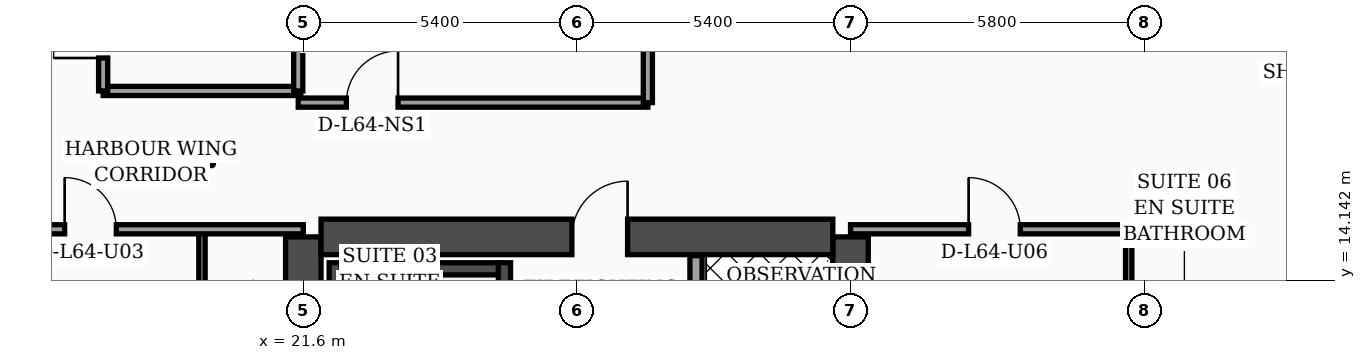
"""IFC4 building model, lengths in metres.
Left out: names, types, materials, properties, quantities, classifications, styles, units other than length and angle.
Written with IfcOpenShell. Run it as: python <this file> out.ifc"""

import sys

from ifc_helpers import new_model, si_unit, direction, frame, frame_2d, origin, place, context, subcontext, project, spatial, rectangle, extrude, element, fill, save


model = new_model("IFC4")
c1 = context("Model", 3, precision=1e-05, world=origin(), true_north=direction((0.0, 1.0)))
c2 = subcontext(c1, "Body", "Model", "MODEL_VIEW")
j1 = project(units=[si_unit("LENGTHUNIT", "METRE"), si_unit("PLANEANGLEUNIT", "RADIAN")], contexts=[c1])
p1 = place(None, origin())
s1 = spatial("IfcSite", under=j1, at=p1, CompositionType="ELEMENT")
p2 = place(p1, origin())
s2 = spatial("IfcBuilding", under=s1, at=p2, CompositionType="ELEMENT")
p3 = place(p2, frame((0.0, 0.0, 259.0)))
s3 = spatial("IfcBuildingStorey", under=s2, at=p3, CompositionType="ELEMENT", Elevation=259.0)
for number, where, z_axis, x_axis in (
    (1, (21.6, 4.6, 0.0), (0.0, 0.0, 1.0), (0.0, 1.0, 0.0)),
    (2, (32.4, 4.6, 0.0), (0.0, 0.0, 1.0), (0.0, 1.0, 0.0)),
):
    element("IfcWall", number, at=place(p3, frame(where, z_axis=z_axis, x_axis=x_axis)), inside=s3, PredefinedType="SHEAR", context=c2, shape_type="SweptSolid", body=[
        extrude(rectangle(XDim=10.4, YDim=0.7, at=frame_2d((5.2, 0.0))), origin(), (0.0, 0.0, 1.0), 4.05),
    ])
p4 = place(p3, frame((21.95, 15.0, 0.0), z_axis=(0.0, 0.0, 1.0), x_axis=(1.0, 0.0, 0.0)))
e3 = element("IfcWall", 3, at=p4, inside=s3, PredefinedType="SHEAR", context=c2, shape_type="SweptSolid", body=[
    extrude(rectangle(XDim=10.1, YDim=0.7, at=frame_2d((5.05, 0.0))), origin(), (0.0, 0.0, 1.0), 4.05),
])
p5 = place(p4, frame((4.95, 0.0, 0.0)))
e4 = element("IfcOpeningElement", 4, at=p5, cuts=e3, PredefinedType="OPENING", context=c2, shape_type="SweptSolid", body=[
    extrude(rectangle(XDim=1.1, YDim=2.2, at=frame_2d((0.55, 1.1))), frame((0.0, 0.36, 0.0), z_axis=(0.0, -1.0, 0.0), x_axis=(1.0, 0.0, 0.0)), (0.0, 0.0, 1.0), 0.72),
])
p6 = place(p3, frame((22.23, 4.95, 0.0), z_axis=(0.0, 0.0, 1.0), x_axis=(0.0, 1.0, 0.0)))
e5 = element("IfcWall", 5, at=p6, inside=s3, PredefinedType="SOLIDWALL", context=c2, shape_type="SweptSolid", body=[
    extrude(rectangle(XDim=9.54, YDim=0.24, at=frame_2d((4.77, 0.0))), origin(), (0.0, 0.0, 1.0), 4.05),
])
p7 = place(p3, frame((25.57, 4.95, 0.0), z_axis=(0.0, 0.0, 1.0), x_axis=(0.0, 1.0, 0.0)))
e6 = element("IfcWall", 6, at=p7, inside=s3, PredefinedType="SOLIDWALL", context=c2, shape_type="SweptSolid", body=[
    extrude(rectangle(XDim=9.54, YDim=0.24, at=frame_2d((4.77, 0.0))), origin(), (0.0, 0.0, 1.0), 4.05),
])
p8 = place(p7, frame((0.35, 0.0, 0.0)))
e7 = element("IfcOpeningElement", 7, at=p8, cuts=e6, PredefinedType="OPENING", context=c2, shape_type="SweptSolid", body=[
    extrude(rectangle(XDim=1.15, YDim=2.2, at=frame_2d((0.575, 1.1))), frame((0.0, 0.13, 0.0), z_axis=(0.0, -1.0, 0.0), x_axis=(1.0, 0.0, 0.0)), (0.0, 0.0, 1.0), 0.26),
])
p9 = place(p3, frame((22.35, 14.37, 0.0), z_axis=(0.0, 0.0, 1.0), x_axis=(1.0, 0.0, 0.0)))
e8 = element("IfcWall", 8, at=p9, inside=s3, PredefinedType="SOLIDWALL", context=c2, shape_type="SweptSolid", body=[
    extrude(rectangle(XDim=3.1, YDim=0.24, at=frame_2d((1.55, 0.0))), origin(), (0.0, 0.0, 1.0), 4.05),
])
p10 = place(p3, frame((46.63, 5.505, 0.0), z_axis=(0.0, 0.0, 1.0), x_axis=(-0.300501856448, 0.953781229775, 0.0)))
e9 = element("IfcWall", 9, at=p10, inside=s3, PredefinedType="SOLIDWALL", context=c2, shape_type="SweptSolid", body=[
    extrude(rectangle(XDim=30.814, YDim=0.32, at=frame_2d((15.407, 0.0))), origin(), (0.0, 0.0, 1.0), 4.05),
])
p11 = place(p10, frame((18.796, 0.0, 0.0)))
e10 = element("IfcOpeningElement", 10, at=p11, cuts=e9, PredefinedType="OPENING", context=c2, shape_type="SweptSolid", body=[
    extrude(rectangle(XDim=1.4, YDim=2.25, at=frame_2d((0.7, 1.125))), frame((0.0, 0.17, 0.0), z_axis=(0.0, -1.0, 0.0), x_axis=(1.0, 0.0, 0.0)), (0.0, 0.0, 1.0), 0.34),
])
p12 = place(p10, frame((4.437, 0.0, 0.7)))
e11 = element("IfcOpeningElement", 11, at=p12, cuts=e9, PredefinedType="OPENING", context=c2, shape_type="SweptSolid", body=[
    extrude(rectangle(XDim=1.6, YDim=1.65, at=frame_2d((0.8, 0.825))), frame((0.0, 0.17, 0.0), z_axis=(0.0, -1.0, 0.0), x_axis=(1.0, 0.0, 0.0)), (0.0, 0.0, 1.0), 0.34),
])
p13 = place(p10, frame((9.889, 0.0, 0.7)))
e12 = element("IfcOpeningElement", 12, at=p13, cuts=e9, PredefinedType="OPENING", context=c2, shape_type="SweptSolid", body=[
    extrude(rectangle(XDim=1.6, YDim=1.65, at=frame_2d((0.8, 0.825))), frame((0.0, 0.17, 0.0), z_axis=(0.0, -1.0, 0.0), x_axis=(1.0, 0.0, 0.0)), (0.0, 0.0, 1.0), 0.34),
])
p14 = place(p10, frame((1.6, 0.0, 0.75)))
e13 = element("IfcOpeningElement", 13, at=p14, cuts=e9, PredefinedType="OPENING", context=c2, shape_type="SweptSolid", body=[
    extrude(rectangle(XDim=1.5, YDim=1.6, at=frame_2d((0.75, 0.8))), frame((0.0, 0.17, 0.0), z_axis=(0.0, -1.0, 0.0), x_axis=(1.0, 0.0, 0.0)), (0.0, 0.0, 1.0), 0.34),
])
p15 = place(p10, frame((7.8, 0.0, 0.75)))
e14 = element("IfcOpeningElement", 14, at=p15, cuts=e9, PredefinedType="OPENING", context=c2, shape_type="SweptSolid", body=[
    extrude(rectangle(XDim=1.5, YDim=1.6, at=frame_2d((0.75, 0.8))), frame((0.0, 0.17, 0.0), z_axis=(0.0, -1.0, 0.0), x_axis=(1.0, 0.0, 0.0)), (0.0, 0.0, 1.0), 0.34),
])
p16 = place(p10, frame((11.95, 0.0, 0.75)))
e15 = element("IfcOpeningElement", 15, at=p16, cuts=e9, PredefinedType="OPENING", context=c2, shape_type="SweptSolid", body=[
    extrude(rectangle(XDim=1.5, YDim=1.6, at=frame_2d((0.75, 0.8))), frame((0.0, 0.17, 0.0), z_axis=(0.0, -1.0, 0.0), x_axis=(1.0, 0.0, 0.0)), (0.0, 0.0, 1.0), 0.34),
])
p17 = place(p10, frame((14.0, 0.0, 0.75)))
e16 = element("IfcOpeningElement", 16, at=p17, cuts=e9, PredefinedType="OPENING", context=c2, shape_type="SweptSolid", body=[
    extrude(rectangle(XDim=1.5, YDim=1.6, at=frame_2d((0.75, 0.8))), frame((0.0, 0.17, 0.0), z_axis=(0.0, -1.0, 0.0), x_axis=(1.0, 0.0, 0.0)), (0.0, 0.0, 1.0), 0.34),
])
p18 = place(p10, frame((16.55, 0.0, 0.75)))
e17 = element("IfcOpeningElement", 17, at=p18, cuts=e9, PredefinedType="OPENING", context=c2, shape_type="SweptSolid", body=[
    extrude(rectangle(XDim=1.5, YDim=1.6, at=frame_2d((0.75, 0.8))), frame((0.0, 0.17, 0.0), z_axis=(0.0, -1.0, 0.0), x_axis=(1.0, 0.0, 0.0)), (0.0, 0.0, 1.0), 0.34),
])
p19 = place(p10, frame((20.75, 0.0, 0.75)))
e18 = element("IfcOpeningElement", 18, at=p19, cuts=e9, PredefinedType="OPENING", context=c2, shape_type="SweptSolid", body=[
    extrude(rectangle(XDim=1.5, YDim=1.6, at=frame_2d((0.75, 0.8))), frame((0.0, 0.17, 0.0), z_axis=(0.0, -1.0, 0.0), x_axis=(1.0, 0.0, 0.0)), (0.0, 0.0, 1.0), 0.34),
])
p20 = place(p10, frame((23.3, 0.0, 0.75)))
e19 = element("IfcOpeningElement", 19, at=p20, cuts=e9, PredefinedType="OPENING", context=c2, shape_type="SweptSolid", body=[
    extrude(rectangle(XDim=1.5, YDim=1.6, at=frame_2d((0.75, 0.8))), frame((0.0, 0.17, 0.0), z_axis=(0.0, -1.0, 0.0), x_axis=(1.0, 0.0, 0.0)), (0.0, 0.0, 1.0), 0.34),
])
p21 = place(p10, frame((26.4, 0.0, 0.75)))
e20 = element("IfcOpeningElement", 20, at=p21, cuts=e9, PredefinedType="OPENING", context=c2, shape_type="SweptSolid", body=[
    extrude(rectangle(XDim=1.5, YDim=1.6, at=frame_2d((0.75, 0.8))), frame((0.0, 0.17, 0.0), z_axis=(0.0, -1.0, 0.0), x_axis=(1.0, 0.0, 0.0)), (0.0, 0.0, 1.0), 0.34),
])
p22 = place(p3, frame((29.35, 4.97, 0.0), z_axis=(0.0, 0.0, 1.0), x_axis=(0.0, 1.0, 0.0)))
e21 = element("IfcWall", 21, at=p22, inside=s3, PredefinedType="SOLIDWALL", context=c2, shape_type="SweptSolid", body=[
    extrude(rectangle(XDim=9.66, YDim=0.24, at=frame_2d((4.83, 0.0))), origin(), (0.0, 0.0, 1.0), 4.05),
])
p23 = place(p22, frame((0.55, 0.0, 0.0)))
e22 = element("IfcOpeningElement", 22, at=p23, cuts=e21, PredefinedType="OPENING", context=c2, shape_type="SweptSolid", body=[
    extrude(rectangle(XDim=1.3, YDim=2.35, at=frame_2d((0.65, 1.175))), frame((0.0, 0.13, 0.0), z_axis=(0.0, -1.0, 0.0), x_axis=(1.0, 0.0, 0.0)), (0.0, 0.0, 1.0), 0.26),
])
p24 = place(p3, frame((19.6, 2.44, 0.0), z_axis=(0.0, 0.0, 1.0), x_axis=(0.0, 1.0, 0.0)))
e23 = element("IfcWall", 23, at=p24, inside=s3, PredefinedType="PARTITIONING", context=c2, shape_type="SweptSolid", body=[
    extrude(rectangle(XDim=12.71, YDim=0.125, at=frame_2d((6.355, 0.0))), origin(), (0.0, 0.0, 1.0), 2.35),
])
p25 = place(p24, frame((4.34, 0.0, 0.0)))
e24 = element("IfcOpeningElement", 24, at=p25, cuts=e23, PredefinedType="OPENING", context=c2, shape_type="SweptSolid", body=[
    extrude(rectangle(XDim=0.96, YDim=2.2, at=frame_2d((0.48, 1.1))), frame((0.0, 0.073, 0.0), z_axis=(0.0, -1.0, 0.0), x_axis=(1.0, 0.0, 0.0)), (0.0, 0.0, 1.0), 0.145),
])
p26 = place(p24, frame((10.18, 0.0, 0.0)))
e25 = element("IfcOpeningElement", 25, at=p26, cuts=e23, PredefinedType="OPENING", context=c2, shape_type="SweptSolid", body=[
    extrude(rectangle(XDim=0.9, YDim=2.15, at=frame_2d((0.45, 1.075))), frame((0.0, 0.073, 0.0), z_axis=(0.0, -1.0, 0.0), x_axis=(1.0, 0.0, 0.0)), (0.0, 0.0, 1.0), 0.145),
])
p27 = place(p3, frame((15.15, 15.15, 0.0), z_axis=(0.0, 0.0, 1.0), x_axis=(1.0, 0.0, 0.0)))
e26 = element("IfcWall", 26, at=p27, inside=s3, PredefinedType="PARTITIONING", context=c2, shape_type="SweptSolid", body=[
    extrude(rectangle(XDim=6.45, YDim=0.18, at=frame_2d((3.225, 0.0))), origin(), (0.0, 0.0, 1.0), 2.35),
])
p28 = place(p27, frame((1.74, 0.0, 0.0)))
e27 = element("IfcOpeningElement", 27, at=p28, cuts=e26, PredefinedType="OPENING", context=c2, shape_type="SweptSolid", body=[
    extrude(rectangle(XDim=1.02, YDim=2.2, at=frame_2d((0.51, 1.1))), frame((0.0, 0.1, 0.0), z_axis=(0.0, -1.0, 0.0), x_axis=(1.0, 0.0, 0.0)), (0.0, 0.0, 1.0), 0.2),
])
p29 = place(p3, frame((17.65, 17.88, 0.0), z_axis=(0.0, 0.0, 1.0), x_axis=(1.0, 0.0, 0.0)))
e28 = element("IfcWall", 28, at=p29, inside=s3, PredefinedType="PARTITIONING", context=c2, shape_type="SweptSolid", body=[
    extrude(rectangle(XDim=3.9, YDim=0.18, at=frame_2d((1.95, 0.0))), origin(), (0.0, 0.0, 1.0), 4.05),
])
p30 = place(p3, frame((21.5, 17.88, 0.0), z_axis=(0.0, 0.0, 1.0), x_axis=(0.0, 1.0, 0.0)))
e29 = element("IfcWall", 29, at=p30, inside=s3, PredefinedType="PARTITIONING", context=c2, shape_type="SweptSolid", body=[
    extrude(rectangle(XDim=6.44, YDim=0.18, at=frame_2d((3.22, 0.0))), origin(), (0.0, 0.0, 1.0), 4.05),
])
p31 = place(p3, frame((17.65, 17.88, 0.0), z_axis=(0.0, 0.0, 1.0), x_axis=(0.0, 1.0, 0.0)))
e30 = element("IfcWall", 30, at=p31, inside=s3, PredefinedType="PARTITIONING", context=c2, shape_type="SweptSolid", body=[
    extrude(rectangle(XDim=6.44, YDim=0.18, at=frame_2d((3.22, 0.0))), origin(), (0.0, 0.0, 1.0), 4.05),
])
p32 = place(p31, frame((0.65, 0.0, 0.0)))
e31 = element("IfcOpeningElement", 31, at=p32, cuts=e30, PredefinedType="OPENING", context=c2, shape_type="SweptSolid", body=[
    extrude(rectangle(XDim=0.98, YDim=2.15, at=frame_2d((0.49, 1.075))), frame((0.0, 0.1, 0.0), z_axis=(0.0, -1.0, 0.0), x_axis=(1.0, 0.0, 0.0)), (0.0, 0.0, 1.0), 0.2),
])
p33 = place(p31, frame((3.97, 0.0, 0.0)))
e32 = element("IfcOpeningElement", 32, at=p33, cuts=e30, PredefinedType="OPENING", context=c2, shape_type="SweptSolid", body=[
    extrude(rectangle(XDim=0.96, YDim=2.2, at=frame_2d((0.48, 1.1))), frame((0.0, 0.1, 0.0), z_axis=(0.0, -1.0, 0.0), x_axis=(1.0, 0.0, 0.0)), (0.0, 0.0, 1.0), 0.2),
])
p34 = place(p3, frame((37.89, 2.44, 0.0), z_axis=(0.0, 0.0, 1.0), x_axis=(0.0, 1.0, 0.0)))
e33 = element("IfcWall", 33, at=p34, inside=s3, PredefinedType="PARTITIONING", context=c2, shape_type="SweptSolid", body=[
    extrude(rectangle(XDim=12.71, YDim=0.125, at=frame_2d((6.355, 0.0))), origin(), (0.0, 0.0, 1.0), 2.35),
])
p35 = place(p34, frame((4.35, 0.0, 0.0)))
e34 = element("IfcOpeningElement", 34, at=p35, cuts=e33, PredefinedType="OPENING", context=c2, shape_type="SweptSolid", body=[
    extrude(rectangle(XDim=0.96, YDim=2.2, at=frame_2d((0.48, 1.1))), frame((0.0, 0.073, 0.0), z_axis=(0.0, -1.0, 0.0), x_axis=(1.0, 0.0, 0.0)), (0.0, 0.0, 1.0), 0.145),
])
p36 = place(p34, frame((10.21, 0.0, 0.0)))
e35 = element("IfcOpeningElement", 35, at=p36, cuts=e33, PredefinedType="OPENING", context=c2, shape_type="SweptSolid", body=[
    extrude(rectangle(XDim=0.9, YDim=2.15, at=frame_2d((0.45, 1.075))), frame((0.0, 0.073, 0.0), z_axis=(0.0, -1.0, 0.0), x_axis=(1.0, 0.0, 0.0)), (0.0, 0.0, 1.0), 0.145),
])
p37 = place(p3, frame((32.4, 15.15, 0.0), z_axis=(0.0, 0.0, 1.0), x_axis=(1.0, 0.0, 0.0)))
e36 = element("IfcWall", 36, at=p37, inside=s3, PredefinedType="PARTITIONING", context=c2, shape_type="SweptSolid", body=[
    extrude(rectangle(XDim=7.6, YDim=0.18, at=frame_2d((3.8, 0.0))), origin(), (0.0, 0.0, 1.0), 2.35),
])
p38 = place(p37, frame((2.33, 0.0, 0.0)))
e37 = element("IfcOpeningElement", 37, at=p38, cuts=e36, PredefinedType="OPENING", context=c2, shape_type="SweptSolid", body=[
    extrude(rectangle(XDim=1.02, YDim=2.2, at=frame_2d((0.51, 1.1))), frame((0.0, 0.1, 0.0), z_axis=(0.0, -1.0, 0.0), x_axis=(1.0, 0.0, 0.0)), (0.0, 0.0, 1.0), 0.2),
])
p39 = place(p3, frame((21.5, 17.65, 0.0), z_axis=(0.0, 0.0, 1.0), x_axis=(1.0, 0.0, 0.0)))
e38 = element("IfcWall", 38, at=p39, inside=s3, PredefinedType="PARTITIONING", context=c2, shape_type="SweptSolid", body=[
    extrude(rectangle(XDim=6.9, YDim=0.18, at=frame_2d((3.45, 0.0))), origin(), (0.0, 0.0, 1.0), 2.35),
])
p40 = place(p39, frame((0.95, 0.0, 0.0)))
e39 = element("IfcOpeningElement", 39, at=p40, cuts=e38, PredefinedType="OPENING", context=c2, shape_type="SweptSolid", body=[
    extrude(rectangle(XDim=1.02, YDim=2.2, at=frame_2d((0.51, 1.1))), frame((0.0, 0.1, 0.0), z_axis=(0.0, -1.0, 0.0), x_axis=(1.0, 0.0, 0.0)), (0.0, 0.0, 1.0), 0.2),
])
p41 = place(p3, frame((28.4, 17.65, 0.0), z_axis=(0.0, 0.0, 1.0), x_axis=(0.0, 1.0, 0.0)))
e40 = element("IfcWall", 40, at=p41, inside=s3, PredefinedType="PARTITIONING", context=c2, shape_type="SweptSolid", body=[
    extrude(rectangle(XDim=14.67, YDim=0.18, at=frame_2d((7.335, 0.0))), origin(), (0.0, 0.0, 1.0), 2.35),
])
p42 = place(p28, origin())
e41 = element("IfcDoor", 41, at=p42, inside=s3, OperationType="SINGLE_SWING_LEFT", PredefinedType="DOOR", context=c2, shape_type="SweptSolid", body=[
    extrude(rectangle(XDim=1.02, YDim=2.2, at=frame_2d((0.51, 1.1))), frame((0.0, 0.025, 0.0), z_axis=(0.0, -1.0, 0.0), x_axis=(1.0, 0.0, 0.0)), (0.0, 0.0, 1.0), 0.05),
])
fill(e27, e41)
p43 = place(p32, origin())
e42 = element("IfcDoor", 42, at=p43, inside=s3, OperationType="SINGLE_SWING_LEFT", PredefinedType="DOOR", context=c2, shape_type="SweptSolid", body=[
    extrude(rectangle(XDim=0.98, YDim=2.15, at=frame_2d((0.49, 1.075))), frame((0.0, 0.025, 0.0), z_axis=(0.0, -1.0, 0.0), x_axis=(1.0, 0.0, 0.0)), (0.0, 0.0, 1.0), 0.05),
])
fill(e31, e42)
p44 = place(p38, origin())
e43 = element("IfcDoor", 43, at=p44, inside=s3, OperationType="SINGLE_SWING_LEFT", PredefinedType="DOOR", context=c2, shape_type="SweptSolid", body=[
    extrude(rectangle(XDim=1.02, YDim=2.2, at=frame_2d((0.51, 1.1))), frame((0.0, 0.025, 0.0), z_axis=(0.0, -1.0, 0.0), x_axis=(1.0, 0.0, 0.0)), (0.0, 0.0, 1.0), 0.05),
])
fill(e37, e43)
p45 = place(p40, origin())
e44 = element("IfcDoor", 44, at=p45, inside=s3, OperationType="SINGLE_SWING_RIGHT", PredefinedType="DOOR", context=c2, shape_type="SweptSolid", body=[
    extrude(rectangle(XDim=1.02, YDim=2.2, at=frame_2d((0.51, 1.1))), frame((0.0, 0.025, 0.0), z_axis=(0.0, -1.0, 0.0), x_axis=(1.0, 0.0, 0.0)), (0.0, 0.0, 1.0), 0.05),
])
fill(e39, e44)
p46 = place(p5, origin())
e45 = element("IfcDoor", 45, at=p46, inside=s3, OperationType="SINGLE_SWING_RIGHT", PredefinedType="DOOR", context=c2, shape_type="SweptSolid", body=[
    extrude(rectangle(XDim=1.1, YDim=2.2, at=frame_2d((0.55, 1.1))), frame((0.0, 0.025, 0.0), z_axis=(0.0, -1.0, 0.0), x_axis=(1.0, 0.0, 0.0)), (0.0, 0.0, 1.0), 0.05),
])
fill(e4, e45)
save(model, sys.argv[1])
